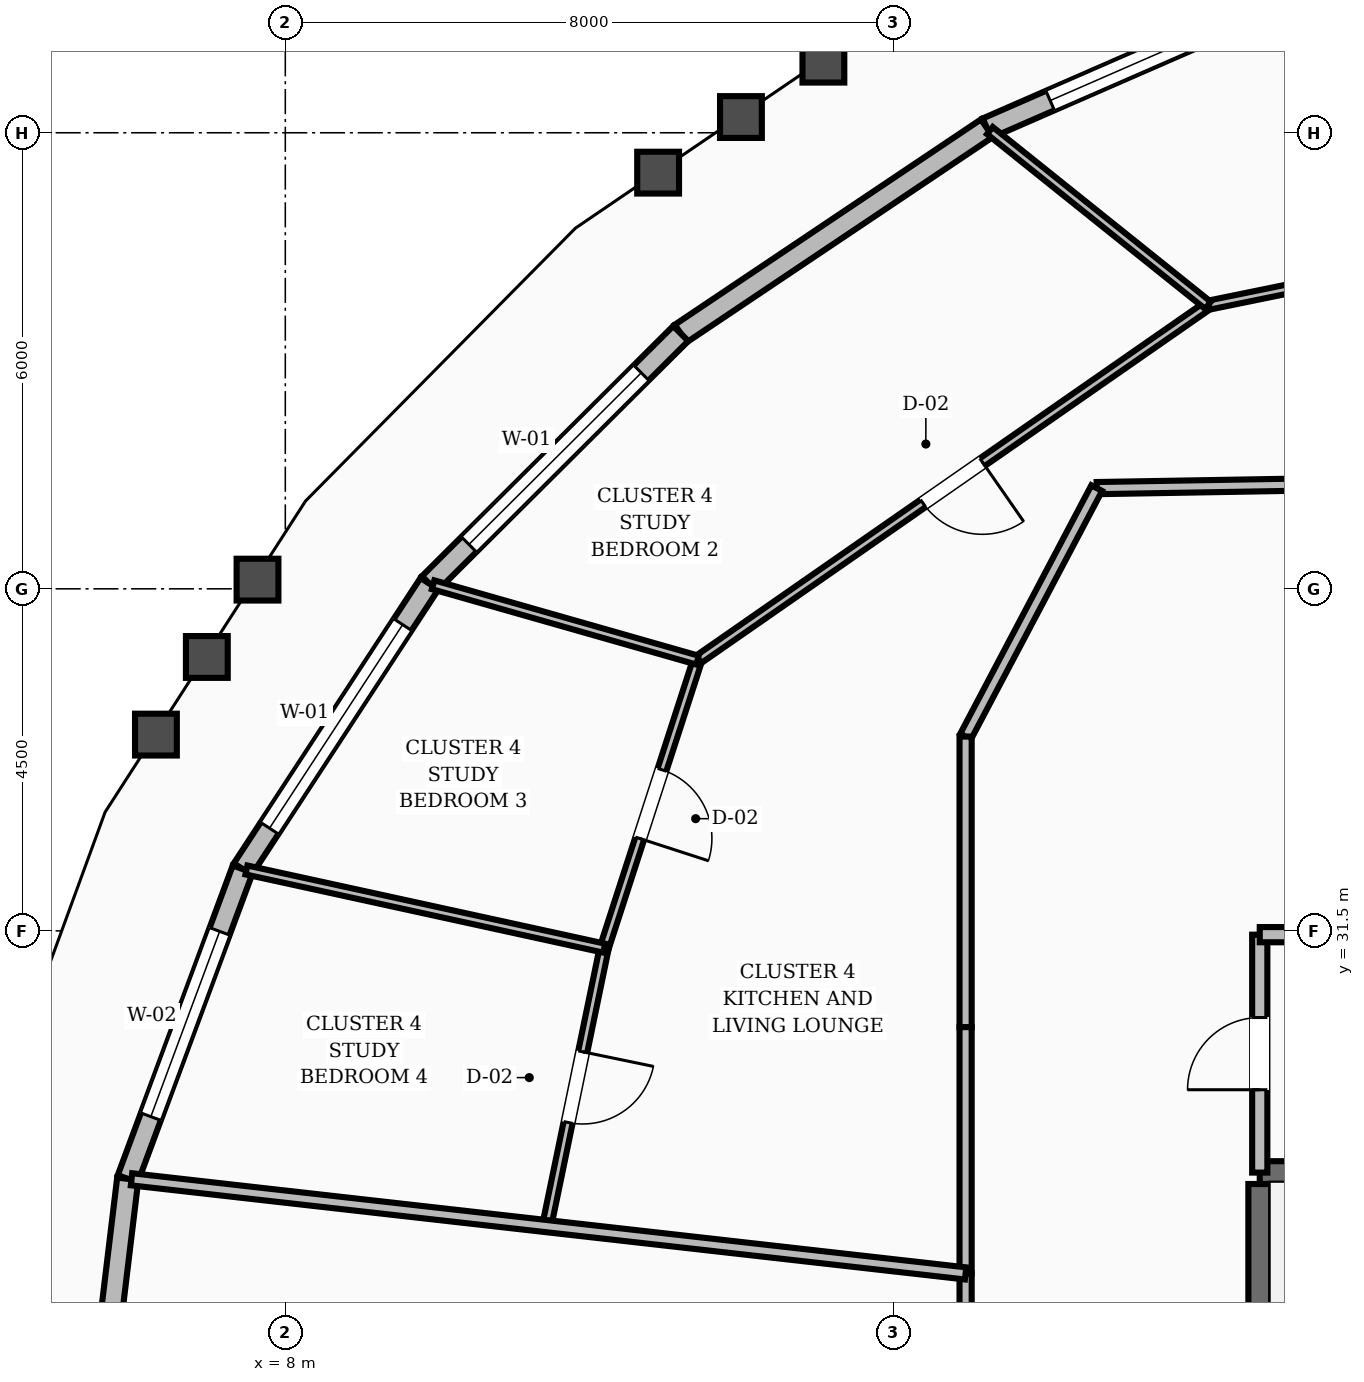
"""IFC4 building model, lengths in metres.
Left out: names, types, materials, properties, quantities, classifications, styles, units other than length and angle.
Written with IfcOpenShell. Run it as: python <this file> out.ifc"""

import sys

from ifc_helpers import new_model, si_unit, direction, frame, frame_2d, origin, place, context, subcontext, project, spatial, rectangle, extrude, element, fill, save


model = new_model("IFC4")
c1 = context("Model", 3, precision=1e-05, world=origin(), true_north=direction((0.0, 1.0)))
c2 = subcontext(c1, "Body", "Model", "MODEL_VIEW")
j1 = project(units=[si_unit("LENGTHUNIT", "METRE"), si_unit("PLANEANGLEUNIT", "RADIAN")], contexts=[c1])
p1 = place(None, origin())
s1 = spatial("IfcSite", under=j1, at=p1, CompositionType="ELEMENT")
p2 = place(p1, origin())
s2 = spatial("IfcBuilding", under=s1, at=p2, CompositionType="ELEMENT")
p3 = place(p2, frame((0.0, 0.0, 131.6)))
s3 = spatial("IfcBuildingStorey", under=s2, at=p3, CompositionType="ELEMENT", Elevation=131.6)
p4 = place(p3, frame((20.82, 19.43, 0.0), z_axis=(0.0, 0.0, 1.0), x_axis=(0.0, 1.0, 0.0)))
e1 = element("IfcWall", 1, at=p4, inside=s3, PredefinedType="SHEAR", context=c2, shape_type="SweptSolid", body=[
    extrude(rectangle(XDim=8.74, YDim=0.3, at=frame_2d((4.37, 0.0))), origin(), (0.0, 0.0, 1.0), 3.6),
])
p5 = place(p3, frame((20.82, 28.32, 0.0), z_axis=(0.0, 0.0, 1.0), x_axis=(1.0, 0.0, 0.0)))
e2 = element("IfcWall", 2, at=p5, inside=s3, PredefinedType="SHEAR", context=c2, shape_type="SweptSolid", body=[
    extrude(rectangle(XDim=3.6, YDim=0.3, at=frame_2d((1.8, 0.0))), origin(), (0.0, 0.0, 1.0), 3.6),
])
p6 = place(p3, frame((21.827, 44.067, 0.0), z_axis=(0.0, 0.0, 1.0), x_axis=(-0.916424160111, -0.400208394171, 0.0)))
e3 = element("IfcWall", 3, at=p6, inside=s3, PredefinedType="STANDARD", context=c2, shape_type="SweptSolid", body=[
    extrude(rectangle(XDim=5.015, YDim=0.28, at=frame_2d((2.508, 0.0))), origin(), (0.0, 0.0, 1.0), 2.82),
])
p7 = place(p6, frame((0.908, 0.0, 0.8)))
e4 = element("IfcOpeningElement", 4, at=p7, cuts=e3, PredefinedType="OPENING", context=c2, shape_type="SweptSolid", body=[
    extrude(rectangle(XDim=3.2, YDim=1.65, at=frame_2d((1.6, 0.825))), frame((0.0, 0.15, 0.0), z_axis=(0.0, -1.0, 0.0), x_axis=(1.0, 0.0, 0.0)), (0.0, 0.0, 1.0), 0.3),
])
p8 = place(p3, frame((17.231, 42.06, 0.0), z_axis=(0.0, 0.0, 1.0), x_axis=(-0.830576039751, -0.556905236277, 0.0)))
e5 = element("IfcWall", 5, at=p8, inside=s3, PredefinedType="STANDARD", context=c2, shape_type="SweptSolid", body=[
    extrude(rectangle(XDim=4.85, YDim=0.28, at=frame_2d((2.425, 0.0))), origin(), (0.0, 0.0, 1.0), 2.82),
])
p9 = place(p3, frame((13.202, 39.359, 0.0), z_axis=(0.0, 0.0, 1.0), x_axis=(-0.708648936292, -0.705561255379, 0.0)))
e6 = element("IfcWall", 6, at=p9, inside=s3, PredefinedType="STANDARD", context=c2, shape_type="SweptSolid", body=[
    extrude(rectangle(XDim=4.665, YDim=0.28, at=frame_2d((2.333, 0.0))), origin(), (0.0, 0.0, 1.0), 2.82),
])
p10 = place(p9, frame((0.733, 0.0, 0.8)))
e7 = element("IfcOpeningElement", 7, at=p10, cuts=e6, PredefinedType="OPENING", context=c2, shape_type="SweptSolid", body=[
    extrude(rectangle(XDim=3.2, YDim=1.65, at=frame_2d((1.6, 0.825))), frame((0.0, 0.15, 0.0), z_axis=(0.0, -1.0, 0.0), x_axis=(1.0, 0.0, 0.0)), (0.0, 0.0, 1.0), 0.3),
])
p11 = place(p3, frame((9.896, 36.067, 0.0), z_axis=(0.0, 0.0, 1.0), x_axis=(-0.547422319482, -0.836856501518, 0.0)))
e8 = element("IfcWall", 8, at=p11, inside=s3, PredefinedType="STANDARD", context=c2, shape_type="SweptSolid", body=[
    extrude(rectangle(XDim=4.488, YDim=0.28, at=frame_2d((2.244, 0.0))), origin(), (0.0, 0.0, 1.0), 2.82),
])
p12 = place(p11, frame((0.644, 0.0, 0.8)))
e9 = element("IfcOpeningElement", 9, at=p12, cuts=e8, PredefinedType="OPENING", context=c2, shape_type="SweptSolid", body=[
    extrude(rectangle(XDim=3.2, YDim=1.65, at=frame_2d((1.6, 0.825))), frame((0.0, 0.15, 0.0), z_axis=(0.0, -1.0, 0.0), x_axis=(1.0, 0.0, 0.0)), (0.0, 0.0, 1.0), 0.3),
])
p13 = place(p3, frame((7.44, 32.312, 0.0), z_axis=(0.0, 0.0, 1.0), x_axis=(-0.348099086438, -0.937457746259, 0.0)))
e10 = element("IfcWall", 10, at=p13, inside=s3, PredefinedType="STANDARD", context=c2, shape_type="SweptSolid", body=[
    extrude(rectangle(XDim=4.346, YDim=0.28, at=frame_2d((2.173, 0.0))), origin(), (0.0, 0.0, 1.0), 2.82),
])
p14 = place(p13, frame((0.873, 0.0, 0.8)))
e11 = element("IfcOpeningElement", 11, at=p14, cuts=e10, PredefinedType="OPENING", context=c2, shape_type="SweptSolid", body=[
    extrude(rectangle(XDim=2.6, YDim=1.65, at=frame_2d((1.3, 0.825))), frame((0.0, 0.15, 0.0), z_axis=(0.0, -1.0, 0.0), x_axis=(1.0, 0.0, 0.0)), (0.0, 0.0, 1.0), 0.3),
])
p15 = place(p3, frame((5.927, 28.238, 0.0), z_axis=(0.0, 0.0, 1.0), x_axis=(-0.119661715739, -0.992814722789, 0.0)))
e12 = element("IfcWall", 12, at=p15, inside=s3, PredefinedType="STANDARD", context=c2, shape_type="SweptSolid", body=[
    extrude(rectangle(XDim=4.268, YDim=0.28, at=frame_2d((2.134, 0.0))), origin(), (0.0, 0.0, 1.0), 2.82),
])
p16 = place(p3, frame((20.82, 28.32, 0.0), z_axis=(0.0, 0.0, 1.0), x_axis=(0.0, 1.0, 0.0)))
e13 = element("IfcWall", 13, at=p16, inside=s3, PredefinedType="SOLIDWALL", context=c2, shape_type="SweptSolid", body=[
    extrude(rectangle(XDim=3.13, YDim=0.2, at=frame_2d((1.565, 0.0))), origin(), (0.0, 0.0, 1.0), 2.8),
])
p17 = place(p16, frame((1.09, 0.0, 0.0)))
e14 = element("IfcOpeningElement", 14, at=p17, cuts=e13, PredefinedType="OPENING", context=c2, shape_type="SweptSolid", body=[
    extrude(rectangle(XDim=0.95, YDim=2.1, at=frame_2d((0.475, 1.05))), frame((0.0, 0.11, 0.0), z_axis=(0.0, -1.0, 0.0), x_axis=(1.0, 0.0, 0.0)), (0.0, 0.0, 1.0), 0.22),
])
p18 = place(p3, frame((20.82, 31.45, 0.0), z_axis=(0.0, 0.0, 1.0), x_axis=(1.0, 0.0, 0.0)))
e15 = element("IfcWall", 15, at=p18, inside=s3, PredefinedType="SOLIDWALL", context=c2, shape_type="SweptSolid", body=[
    extrude(rectangle(XDim=3.98, YDim=0.2, at=frame_2d((1.99, 0.0))), origin(), (0.0, 0.0, 1.0), 2.8),
])
p19 = place(p3, frame((23.046, 37.4, 0.0), z_axis=(0.0, 0.0, 1.0), x_axis=(-0.999853038912, -0.017143528788, 0.0)))
e16 = element("IfcWall", 16, at=p19, inside=s3, PredefinedType="SOLIDWALL", context=c2, shape_type="SweptSolid", body=[
    extrude(rectangle(XDim=4.372, YDim=0.16, at=frame_2d((2.186, 0.0))), origin(), (0.0, 0.0, 1.0), 2.8),
])
p20 = place(p3, frame((18.675, 37.325, 0.0), z_axis=(0.0, 0.0, 1.0), x_axis=(-0.466737093093, -0.884396113702, 0.0)))
e17 = element("IfcWall", 17, at=p20, inside=s3, PredefinedType="SOLIDWALL", context=c2, shape_type="SweptSolid", body=[
    extrude(rectangle(XDim=3.696, YDim=0.16, at=frame_2d((1.848, 0.0))), origin(), (0.0, 0.0, 1.0), 2.8),
])
p21 = place(p3, frame((16.95, 34.056, 0.0), z_axis=(0.0, 0.0, 1.0), x_axis=(0.0, -1.0, 0.0)))
e18 = element("IfcWall", 18, at=p21, inside=s3, PredefinedType="SOLIDWALL", context=c2, shape_type="SweptSolid", body=[
    extrude(rectangle(XDim=3.822, YDim=0.16, at=frame_2d((1.911, 0.0))), origin(), (0.0, 0.0, 1.0), 2.8),
])
p22 = place(p3, frame((16.95, 30.234, 0.0), z_axis=(0.0, 0.0, 1.0), x_axis=(0.0, -1.0, 0.0)))
e19 = element("IfcWall", 19, at=p22, inside=s3, PredefinedType="SOLIDWALL", context=c2, shape_type="SweptSolid", body=[
    extrude(rectangle(XDim=3.24, YDim=0.16, at=frame_2d((1.62, 0.0))), origin(), (0.0, 0.0, 1.0), 2.8),
])
p23 = place(p3, frame((16.95, 26.994, 0.0), z_axis=(0.0, 0.0, 1.0), x_axis=(0.0, -1.0, 0.0)))
e20 = element("IfcWall", 20, at=p23, inside=s3, PredefinedType="SOLIDWALL", context=c2, shape_type="SweptSolid", body=[
    extrude(rectangle(XDim=2.994, YDim=0.16, at=frame_2d((1.497, 0.0))), origin(), (0.0, 0.0, 1.0), 2.8),
])
p24 = place(p3, frame((28.074, 41.352, 0.0), z_axis=(0.0, 0.0, 1.0), x_axis=(-0.979753649481, -0.200206858844, 0.0)))
e21 = element("IfcWall", 21, at=p24, inside=s3, PredefinedType="PARTITIONING", context=c2, shape_type="SweptSolid", body=[
    extrude(rectangle(XDim=8.1, YDim=0.12, at=frame_2d((4.05, 0.0))), origin(), (0.0, 0.0, 1.0), 2.8),
])
p25 = place(p24, frame((4.954, 0.0, 0.0)))
e22 = element("IfcOpeningElement", 22, at=p25, cuts=e21, PredefinedType="OPENING", context=c2, shape_type="SweptSolid", body=[
    extrude(rectangle(XDim=0.95, YDim=2.1, at=frame_2d((0.475, 1.05))), frame((0.0, 0.07, 0.0), z_axis=(0.0, -1.0, 0.0), x_axis=(1.0, 0.0, 0.0)), (0.0, 0.0, 1.0), 0.14),
])
p26 = place(p3, frame((20.139, 39.73, 0.0), z_axis=(0.0, 0.0, 1.0), x_axis=(-0.82110532268, -0.570776706837, 0.0)))
e23 = element("IfcWall", 23, at=p26, inside=s3, PredefinedType="PARTITIONING", context=c2, shape_type="SweptSolid", body=[
    extrude(rectangle(XDim=8.179, YDim=0.12, at=frame_2d((4.089, 0.0))), origin(), (0.0, 0.0, 1.0), 2.8),
])
p27 = place(p26, frame((3.614, 0.0, 0.0)))
e24 = element("IfcOpeningElement", 24, at=p27, cuts=e23, PredefinedType="OPENING", context=c2, shape_type="SweptSolid", body=[
    extrude(rectangle(XDim=0.95, YDim=2.1, at=frame_2d((0.475, 1.05))), frame((0.0, 0.07, 0.0), z_axis=(0.0, -1.0, 0.0), x_axis=(1.0, 0.0, 0.0)), (0.0, 0.0, 1.0), 0.14),
])
p28 = place(p3, frame((20.139, 39.73, 0.0), z_axis=(0.0, 0.0, 1.0), x_axis=(-0.780350196962, 0.625342762093, 0.0)))
e25 = element("IfcWall", 25, at=p28, inside=s3, PredefinedType="PARTITIONING", context=c2, shape_type="SweptSolid", body=[
    extrude(rectangle(XDim=3.676, YDim=0.12, at=frame_2d((1.838, 0.0))), origin(), (0.0, 0.0, 1.0), 2.8),
])
p29 = place(p3, frame((13.423, 35.062, 0.0), z_axis=(0.0, 0.0, 1.0), x_axis=(-0.308383277177, -0.951262190123, 0.0)))
e26 = element("IfcWall", 26, at=p29, inside=s3, PredefinedType="PARTITIONING", context=c2, shape_type="SweptSolid", body=[
    extrude(rectangle(XDim=3.983, YDim=0.12, at=frame_2d((1.991, 0.0))), origin(), (0.0, 0.0, 1.0), 2.8),
])
p30 = place(p29, frame((1.516, 0.0, 0.0)))
e27 = element("IfcOpeningElement", 27, at=p30, cuts=e26, PredefinedType="OPENING", context=c2, shape_type="SweptSolid", body=[
    extrude(rectangle(XDim=0.95, YDim=2.1, at=frame_2d((0.475, 1.05))), frame((0.0, 0.07, 0.0), z_axis=(0.0, -1.0, 0.0), x_axis=(1.0, 0.0, 0.0)), (0.0, 0.0, 1.0), 0.14),
])
p31 = place(p3, frame((13.423, 35.062, 0.0), z_axis=(0.0, 0.0, 1.0), x_axis=(-0.961663905894, 0.274230800789, 0.0)))
e28 = element("IfcWall", 28, at=p31, inside=s3, PredefinedType="PARTITIONING", context=c2, shape_type="SweptSolid", body=[
    extrude(rectangle(XDim=3.617, YDim=0.12, at=frame_2d((1.809, 0.0))), origin(), (0.0, 0.0, 1.0), 2.8),
])
p32 = place(p3, frame((12.195, 31.273, 0.0), z_axis=(0.0, 0.0, 1.0), x_axis=(-0.202510495047, -0.979280092413, 0.0)))
e29 = element("IfcWall", 29, at=p32, inside=s3, PredefinedType="PARTITIONING", context=c2, shape_type="SweptSolid", body=[
    extrude(rectangle(XDim=3.735, YDim=0.12, at=frame_2d((1.867, 0.0))), origin(), (0.0, 0.0, 1.0), 2.8),
])
p33 = place(p32, frame((1.393, 0.0, 0.0)))
e30 = element("IfcOpeningElement", 30, at=p33, cuts=e29, PredefinedType="OPENING", context=c2, shape_type="SweptSolid", body=[
    extrude(rectangle(XDim=0.95, YDim=2.1, at=frame_2d((0.475, 1.05))), frame((0.0, 0.07, 0.0), z_axis=(0.0, -1.0, 0.0), x_axis=(1.0, 0.0, 0.0)), (0.0, 0.0, 1.0), 0.14),
])
p34 = place(p3, frame((12.195, 31.273, 0.0), z_axis=(0.0, 0.0, 1.0), x_axis=(-0.976938355299, 0.213521544453, 0.0)))
e31 = element("IfcWall", 31, at=p34, inside=s3, PredefinedType="PARTITIONING", context=c2, shape_type="SweptSolid", body=[
    extrude(rectangle(XDim=4.817, YDim=0.12, at=frame_2d((2.409, 0.0))), origin(), (0.0, 0.0, 1.0), 2.8),
])
p35 = place(p3, frame((16.95, 26.994, 0.0), z_axis=(0.0, 0.0, 1.0), x_axis=(-0.993693003729, 0.112134804319, 0.0)))
e32 = element("IfcWall", 32, at=p35, inside=s3, PredefinedType="SOLIDWALL", context=c2, shape_type="SweptSolid", body=[
    extrude(rectangle(XDim=11.043, YDim=0.16, at=frame_2d((5.521, 0.0))), origin(), (0.0, 0.0, 1.0), 2.8),
])
p36 = place(p7, origin())
e33 = element("IfcWindow", 33, at=p36, inside=s3, PartitioningType="SINGLE_PANEL", PredefinedType="WINDOW", context=c2, shape_type="SweptSolid", body=[
    extrude(rectangle(XDim=3.2, YDim=1.65, at=frame_2d((1.6, 0.825))), frame((0.0, 0.03, 0.0), z_axis=(0.0, -1.0, 0.0), x_axis=(1.0, 0.0, 0.0)), (0.0, 0.0, 1.0), 0.06),
])
fill(e4, e33)
p37 = place(p10, origin())
e34 = element("IfcWindow", 34, at=p37, inside=s3, PartitioningType="SINGLE_PANEL", PredefinedType="WINDOW", context=c2, shape_type="SweptSolid", body=[
    extrude(rectangle(XDim=3.2, YDim=1.65, at=frame_2d((1.6, 0.825))), frame((0.0, 0.03, 0.0), z_axis=(0.0, -1.0, 0.0), x_axis=(1.0, 0.0, 0.0)), (0.0, 0.0, 1.0), 0.06),
])
fill(e7, e34)
p38 = place(p12, origin())
e35 = element("IfcWindow", 35, at=p38, inside=s3, PartitioningType="SINGLE_PANEL", PredefinedType="WINDOW", context=c2, shape_type="SweptSolid", body=[
    extrude(rectangle(XDim=3.2, YDim=1.65, at=frame_2d((1.6, 0.825))), frame((0.0, 0.03, 0.0), z_axis=(0.0, -1.0, 0.0), x_axis=(1.0, 0.0, 0.0)), (0.0, 0.0, 1.0), 0.06),
])
fill(e9, e35)
p39 = place(p14, origin())
e36 = element("IfcWindow", 36, at=p39, inside=s3, PartitioningType="SINGLE_PANEL", PredefinedType="WINDOW", context=c2, shape_type="SweptSolid", body=[
    extrude(rectangle(XDim=2.6, YDim=1.65, at=frame_2d((1.3, 0.825))), frame((0.0, 0.03, 0.0), z_axis=(0.0, -1.0, 0.0), x_axis=(1.0, 0.0, 0.0)), (0.0, 0.0, 1.0), 0.06),
])
fill(e11, e36)
p40 = place(p17, origin())
e37 = element("IfcDoor", 37, at=p40, inside=s3, OperationType="SINGLE_SWING_LEFT", PredefinedType="DOOR", context=c2, shape_type="SweptSolid", body=[
    extrude(rectangle(XDim=0.95, YDim=2.1, at=frame_2d((0.475, 1.05))), frame((0.0, 0.025, 0.0), z_axis=(0.0, -1.0, 0.0), x_axis=(1.0, 0.0, 0.0)), (0.0, 0.0, 1.0), 0.05),
])
fill(e14, e37)
p41 = place(p27, origin())
e38 = element("IfcDoor", 38, at=p41, inside=s3, OperationType="SINGLE_SWING_LEFT", PredefinedType="DOOR", context=c2, shape_type="SweptSolid", body=[
    extrude(rectangle(XDim=0.95, YDim=2.1, at=frame_2d((0.475, 1.05))), frame((0.0, 0.025, 0.0), z_axis=(0.0, -1.0, 0.0), x_axis=(1.0, 0.0, 0.0)), (0.0, 0.0, 1.0), 0.05),
])
fill(e24, e38)
p42 = place(p30, origin())
e39 = element("IfcDoor", 39, at=p42, inside=s3, OperationType="SINGLE_SWING_RIGHT", PredefinedType="DOOR", context=c2, shape_type="SweptSolid", body=[
    extrude(rectangle(XDim=0.95, YDim=2.1, at=frame_2d((0.475, 1.05))), frame((0.0, 0.025, 0.0), z_axis=(0.0, -1.0, 0.0), x_axis=(1.0, 0.0, 0.0)), (0.0, 0.0, 1.0), 0.05),
])
fill(e27, e39)
p43 = place(p33, origin())
e40 = element("IfcDoor", 40, at=p43, inside=s3, OperationType="SINGLE_SWING_LEFT", PredefinedType="DOOR", context=c2, shape_type="SweptSolid", body=[
    extrude(rectangle(XDim=0.95, YDim=2.1, at=frame_2d((0.475, 1.05))), frame((0.0, 0.025, 0.0), z_axis=(0.0, -1.0, 0.0), x_axis=(1.0, 0.0, 0.0)), (0.0, 0.0, 1.0), 0.05),
])
fill(e30, e40)
save(model, sys.argv[1])
